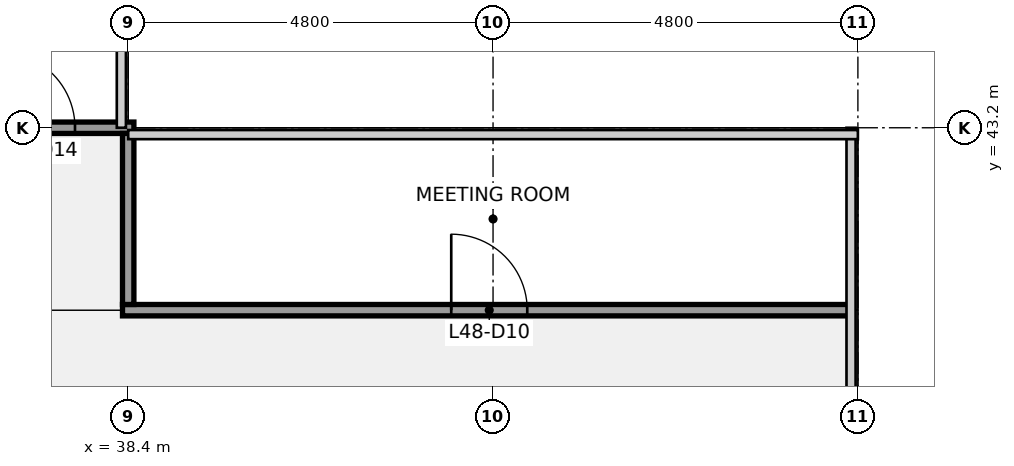
"""IFC4 building model, lengths in metres.
Left out: names, types, materials, properties, quantities, classifications, styles, units other than length and angle.
Written with IfcOpenShell. Run it as: python <this file> out.ifc"""

import sys

from ifc_helpers import new_model, si_unit, direction, frame, frame_2d, origin, place, context, subcontext, project, spatial, rectangle, extrude, element, fill, save


model = new_model("IFC4")
c1 = context("Model", 3, precision=1e-05, world=origin(), true_north=direction((0.0, 1.0)))
c2 = subcontext(c1, "Body", "Model", "MODEL_VIEW")
j1 = project(units=[si_unit("LENGTHUNIT", "METRE"), si_unit("PLANEANGLEUNIT", "RADIAN")], contexts=[c1])
p1 = place(None, origin())
s1 = spatial("IfcSite", under=j1, at=p1, CompositionType="ELEMENT")
p2 = place(p1, origin())
s2 = spatial("IfcBuilding", under=s1, at=p2, CompositionType="ELEMENT")
p3 = place(p2, frame((0.0, 0.0, 221.2)))
s3 = spatial("IfcBuildingStorey", under=s2, at=p3, CompositionType="ELEMENT", Elevation=221.2)
p4 = place(p3, frame((38.325, 40.8, 0.0), z_axis=(0.0, 0.0, 1.0), x_axis=(1.0, 0.0, 0.0)))
e1 = element("IfcWall", 1, at=p4, inside=s3, PredefinedType="PARTITIONING", context=c2, shape_type="SweptSolid", body=[
    extrude(rectangle(XDim=9.575, YDim=0.15, at=frame_2d((4.788, 0.0))), origin(), (0.0, 0.0, 1.0), 2.87),
])
p5 = place(p4, frame((4.325, 0.0, 0.0)))
e2 = element("IfcOpeningElement", 2, at=p5, cuts=e1, PredefinedType="OPENING", context=c2, shape_type="SweptSolid", body=[
    extrude(rectangle(XDim=1.0, YDim=2.1, at=frame_2d((0.5, 1.05))), frame((0.0, 0.085, 0.0), z_axis=(0.0, -1.0, 0.0), x_axis=(1.0, 0.0, 0.0)), (0.0, 0.0, 1.0), 0.17),
])
p6 = place(p3, frame((19.125, 43.2, 0.0), z_axis=(0.0, 0.0, 1.0), x_axis=(1.0, 0.0, 0.0)))
e3 = element("IfcWall", 3, at=p6, inside=s3, PredefinedType="PARTITIONING", context=c2, shape_type="SweptSolid", body=[
    extrude(rectangle(XDim=19.35, YDim=0.15, at=frame_2d((9.675, 0.0))), origin(), (0.0, 0.0, 1.0), 2.87),
])
p7 = place(p6, frame((4.375, 0.0, 0.0)))
e4 = element("IfcOpeningElement", 4, at=p7, cuts=e3, PredefinedType="OPENING", context=c2, shape_type="SweptSolid", body=[
    extrude(rectangle(XDim=1.0, YDim=2.1, at=frame_2d((0.5, 1.05))), frame((0.0, 0.085, 0.0), z_axis=(0.0, -1.0, 0.0), x_axis=(1.0, 0.0, 0.0)), (0.0, 0.0, 1.0), 0.17),
])
p8 = place(p6, frame((10.375, 0.0, 0.0)))
e5 = element("IfcOpeningElement", 5, at=p8, cuts=e3, PredefinedType="OPENING", context=c2, shape_type="SweptSolid", body=[
    extrude(rectangle(XDim=1.0, YDim=2.1, at=frame_2d((0.5, 1.05))), frame((0.0, 0.085, 0.0), z_axis=(0.0, -1.0, 0.0), x_axis=(1.0, 0.0, 0.0)), (0.0, 0.0, 1.0), 0.17),
])
p9 = place(p6, frame((13.975, 0.0, 0.0)))
e6 = element("IfcOpeningElement", 6, at=p9, cuts=e3, PredefinedType="OPENING", context=c2, shape_type="SweptSolid", body=[
    extrude(rectangle(XDim=1.0, YDim=2.1, at=frame_2d((0.5, 1.05))), frame((0.0, 0.085, 0.0), z_axis=(0.0, -1.0, 0.0), x_axis=(1.0, 0.0, 0.0)), (0.0, 0.0, 1.0), 0.17),
])
p10 = place(p6, frame((17.575, 0.0, 0.0)))
e7 = element("IfcOpeningElement", 7, at=p10, cuts=e3, PredefinedType="OPENING", context=c2, shape_type="SweptSolid", body=[
    extrude(rectangle(XDim=1.0, YDim=2.1, at=frame_2d((0.5, 1.05))), frame((0.0, 0.085, 0.0), z_axis=(0.0, -1.0, 0.0), x_axis=(1.0, 0.0, 0.0)), (0.0, 0.0, 1.0), 0.17),
])
p11 = place(p3, frame((38.4, 40.875, 0.0), z_axis=(0.0, 0.0, 1.0), x_axis=(0.0, 1.0, 0.0)))
e8 = element("IfcWall", 8, at=p11, inside=s3, PredefinedType="PARTITIONING", context=c2, shape_type="SweptSolid", body=[
    extrude(rectangle(XDim=2.25, YDim=0.15, at=frame_2d((1.125, 0.0))), origin(), (0.0, 0.0, 1.0), 2.87),
])
p12 = place(p5, origin())
e9 = element("IfcDoor", 9, at=p12, inside=s3, OperationType="SINGLE_SWING_LEFT", PredefinedType="DOOR", context=c2, shape_type="SweptSolid", body=[
    extrude(rectangle(XDim=1.0, YDim=2.1, at=frame_2d((0.5, 1.05))), frame((0.0, 0.025, 0.0), z_axis=(0.0, -1.0, 0.0), x_axis=(1.0, 0.0, 0.0)), (0.0, 0.0, 1.0), 0.05),
])
fill(e2, e9)
p13 = place(p10, origin())
e10 = element("IfcDoor", 10, at=p13, inside=s3, OperationType="SINGLE_SWING_LEFT", PredefinedType="DOOR", context=c2, shape_type="SweptSolid", body=[
    extrude(rectangle(XDim=1.0, YDim=2.1, at=frame_2d((0.5, 1.05))), frame((0.0, 0.025, 0.0), z_axis=(0.0, -1.0, 0.0), x_axis=(1.0, 0.0, 0.0)), (0.0, 0.0, 1.0), 0.05),
])
fill(e7, e10)
save(model, sys.argv[1])
